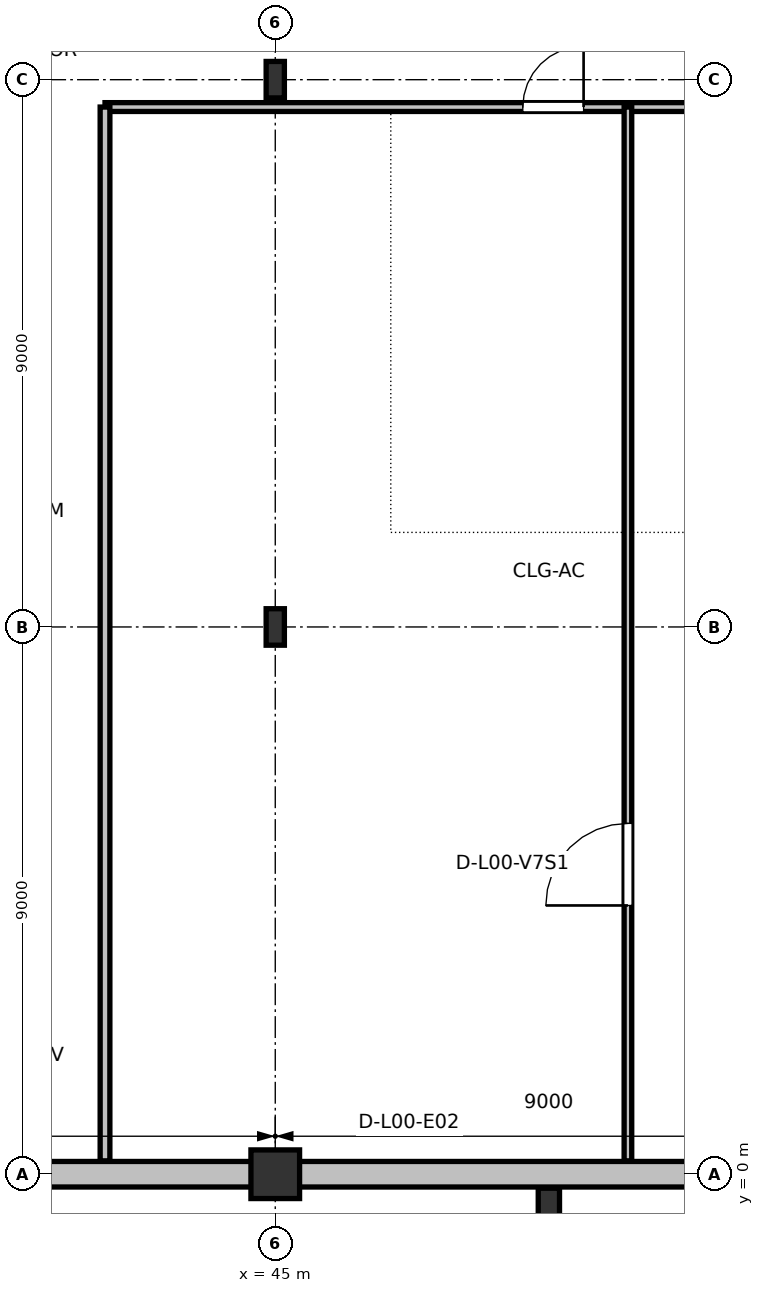
"""IFC4 building model, lengths in metres.
Left out: names, types, materials, properties, quantities, classifications, styles, units other than length and angle.
Written with IfcOpenShell. Run it as: python <this file> out.ifc"""

import sys

from ifc_helpers import new_model, si_unit, direction, frame, frame_2d, origin, origin_2d, place, context, subcontext, project, spatial, rectangle, i_section, extrude, element, fill, save


model = new_model("IFC4")
c1 = context("Model", 3, precision=1e-05, world=origin(), true_north=direction((0.0, 1.0)))
c2 = subcontext(c1, "Body", "Model", "MODEL_VIEW")
j1 = project(units=[si_unit("LENGTHUNIT", "METRE"), si_unit("PLANEANGLEUNIT", "RADIAN")], contexts=[c1])
p1 = place(None, origin())
s1 = spatial("IfcSite", under=j1, at=p1, CompositionType="ELEMENT")
p2 = place(p1, origin())
s2 = spatial("IfcBuilding", under=s1, at=p2, CompositionType="ELEMENT")
p3 = place(p2, origin())
s3 = spatial("IfcBuildingStorey", under=s2, at=p3, CompositionType="ELEMENT", Elevation=0.0)
p4 = place(p3, frame((49.5, -0.48, 0.0), z_axis=(0.0, 0.0, 1.0), x_axis=(1.0, 0.0, 0.0)))
e1 = element("IfcColumn", 1, at=p4, inside=s3, PredefinedType="PILASTER", context=c2, shape_type="SweptSolid", body=[
    extrude(rectangle(XDim=0.35, YDim=0.5, at=origin_2d()), origin(), (0.0, 0.0, 1.0), 5.4),
])
p5 = place(p3, frame((45.0, 0.0, 0.0), z_axis=(0.0, 0.0, 1.0), x_axis=(1.0, 0.0, 0.0)))
e2 = element("IfcColumn", 2, at=p5, inside=s3, PredefinedType="COLUMN", context=c2, shape_type="SweptSolid", body=[
    extrude(rectangle(XDim=0.8, YDim=0.8, at=origin_2d()), origin(), (0.0, 0.0, 1.0), 5.4),
])
for number, where, z_axis, x_axis in (
    (3, (45.0, 9.0, 0.0), (0.0, 0.0, 1.0), (1.0, 0.0, 0.0)),
    (4, (45.0, 18.0, 0.0), (0.0, 0.0, 1.0), (1.0, 0.0, 0.0)),
):
    element("IfcColumn", number, at=place(p3, frame(where, z_axis=z_axis, x_axis=x_axis)), inside=s3, PredefinedType="COLUMN", context=c2, shape_type="SweptSolid", body=[
        extrude(i_section(OverallWidth=0.3, OverallDepth=0.6, WebThickness=0.015, FlangeThickness=0.03, at=origin_2d()), origin(), (0.0, 0.0, 1.0), 5.4),
    ])
p6 = place(p3, frame((36.385, 0.0, 0.0), z_axis=(0.0, 0.0, 1.0), x_axis=(1.0, 0.0, 0.0)))
e5 = element("IfcWall", 5, at=p6, inside=s3, PredefinedType="STANDARD", context=c2, shape_type="SweptSolid", body=[
    extrude(rectangle(XDim=8.23, YDim=0.42, at=frame_2d((4.115, 0.0))), origin(), (0.0, 0.0, 1.0), 3.79),
])
p7 = place(p6, frame((0.765, 0.0, 0.0)))
e6 = element("IfcOpeningElement", 6, at=p7, cuts=e5, PredefinedType="OPENING", context=c2, shape_type="SweptSolid", body=[
    extrude(rectangle(XDim=2.1, YDim=2.6, at=frame_2d((1.05, 1.3))), frame((0.0, 0.22, 0.0), z_axis=(0.0, -1.0, 0.0), x_axis=(1.0, 0.0, 0.0)), (0.0, 0.0, 1.0), 0.44),
])
p8 = place(p3, frame((45.385, 0.0, 0.0), z_axis=(0.0, 0.0, 1.0), x_axis=(1.0, 0.0, 0.0)))
e7 = element("IfcWall", 7, at=p8, inside=s3, PredefinedType="STANDARD", context=c2, shape_type="SweptSolid", body=[
    extrude(rectangle(XDim=8.23, YDim=0.42, at=frame_2d((4.115, 0.0))), origin(), (0.0, 0.0, 1.0), 3.79),
])
p9 = place(p8, frame((0.815, 0.0, 0.0)))
e8 = element("IfcOpeningElement", 8, at=p9, cuts=e7, PredefinedType="OPENING", context=c2, shape_type="SweptSolid", body=[
    extrude(rectangle(XDim=2.0, YDim=2.55, at=frame_2d((1.0, 1.275))), frame((0.0, 0.22, 0.0), z_axis=(0.0, -1.0, 0.0), x_axis=(1.0, 0.0, 0.0)), (0.0, 0.0, 1.0), 0.44),
])
p10 = place(p3, frame((42.2, 17.55, 0.0), z_axis=(0.0, 0.0, 1.0), x_axis=(1.0, 0.0, 0.0)))
e9 = element("IfcWall", 9, at=p10, inside=s3, PredefinedType="PARTITIONING", context=c2, shape_type="SweptSolid", body=[
    extrude(rectangle(XDim=23.6, YDim=0.145, at=frame_2d((11.8, 0.0))), origin(), (0.0, 0.0, 1.0), 5.16),
])
p11 = place(p10, frame((6.871, 0.0, 0.0)))
e10 = element("IfcOpeningElement", 10, at=p11, cuts=e9, PredefinedType="OPENING", context=c2, shape_type="SweptSolid", body=[
    extrude(rectangle(XDim=1.0, YDim=2.14, at=frame_2d((0.5, 1.07))), frame((0.0, 0.083, 0.0), z_axis=(0.0, -1.0, 0.0), x_axis=(1.0, 0.0, 0.0)), (0.0, 0.0, 1.0), 0.165),
])
p12 = place(p10, frame((15.912, 0.0, 0.0)))
e11 = element("IfcOpeningElement", 11, at=p12, cuts=e9, PredefinedType="OPENING", context=c2, shape_type="SweptSolid", body=[
    extrude(rectangle(XDim=0.95, YDim=2.12, at=frame_2d((0.475, 1.06))), frame((0.0, 0.083, 0.0), z_axis=(0.0, -1.0, 0.0), x_axis=(1.0, 0.0, 0.0)), (0.0, 0.0, 1.0), 0.165),
])
p13 = place(p10, frame((22.25, 0.0, 0.0)))
e12 = element("IfcOpeningElement", 12, at=p13, cuts=e9, PredefinedType="OPENING", context=c2, shape_type="SweptSolid", body=[
    extrude(rectangle(XDim=0.9, YDim=2.1, at=frame_2d((0.45, 1.05))), frame((0.0, 0.083, 0.0), z_axis=(0.0, -1.0, 0.0), x_axis=(1.0, 0.0, 0.0)), (0.0, 0.0, 1.0), 0.165),
])
p14 = place(p3, frame((42.2, 0.22, 0.0), z_axis=(0.0, 0.0, 1.0), x_axis=(0.0, 1.0, 0.0)))
e13 = element("IfcWall", 13, at=p14, inside=s3, PredefinedType="PARTITIONING", context=c2, shape_type="SweptSolid", body=[
    extrude(rectangle(XDim=17.33, YDim=0.16, at=frame_2d((8.665, 0.0))), origin(), (0.0, 0.0, 1.0), 5.16),
])
p15 = place(p3, frame((50.8, 0.22, 0.0), z_axis=(0.0, 0.0, 1.0), x_axis=(0.0, 1.0, 0.0)))
e14 = element("IfcWall", 14, at=p15, inside=s3, PredefinedType="PARTITIONING", context=c2, shape_type="SweptSolid", body=[
    extrude(rectangle(XDim=17.33, YDim=0.125, at=frame_2d((8.665, 0.0))), origin(), (0.0, 0.0, 1.0), 5.16),
])
p16 = place(p15, frame((4.2, 0.0, 0.0)))
e15 = element("IfcOpeningElement", 15, at=p16, cuts=e14, PredefinedType="OPENING", context=c2, shape_type="SweptSolid", body=[
    extrude(rectangle(XDim=1.35, YDim=2.18, at=frame_2d((0.675, 1.09))), frame((0.0, 0.073, 0.0), z_axis=(0.0, -1.0, 0.0), x_axis=(1.0, 0.0, 0.0)), (0.0, 0.0, 1.0), 0.145),
])
p17 = place(p9, frame((2.0, 0.0, 0.0), z_axis=(0.0, 0.0, 1.0), x_axis=(-1.0, 0.0, 0.0)))
e16 = element("IfcDoor", 16, at=p17, inside=s3, OperationType="DOUBLE_DOOR_SINGLE_SWING", PredefinedType="DOOR", context=c2, shape_type="SweptSolid", body=[
    extrude(rectangle(XDim=2.0, YDim=2.55, at=frame_2d((1.0, 1.275))), frame((0.0, 0.025, 0.0), z_axis=(0.0, -1.0, 0.0), x_axis=(1.0, 0.0, 0.0)), (0.0, 0.0, 1.0), 0.05),
])
fill(e8, e16)
p18 = place(p11, origin())
e17 = element("IfcDoor", 17, at=p18, inside=s3, OperationType="SINGLE_SWING_RIGHT", PredefinedType="DOOR", context=c2, shape_type="SweptSolid", body=[
    extrude(rectangle(XDim=1.0, YDim=2.14, at=frame_2d((0.5, 1.07))), frame((0.0, 0.025, 0.0), z_axis=(0.0, -1.0, 0.0), x_axis=(1.0, 0.0, 0.0)), (0.0, 0.0, 1.0), 0.05),
])
fill(e10, e17)
p19 = place(p16, origin())
e18 = element("IfcDoor", 18, at=p19, inside=s3, OperationType="SINGLE_SWING_LEFT", PredefinedType="DOOR", context=c2, shape_type="SweptSolid", body=[
    extrude(rectangle(XDim=1.35, YDim=2.18, at=frame_2d((0.675, 1.09))), frame((0.0, 0.025, 0.0), z_axis=(0.0, -1.0, 0.0), x_axis=(1.0, 0.0, 0.0)), (0.0, 0.0, 1.0), 0.05),
])
fill(e15, e18)
save(model, sys.argv[1])
